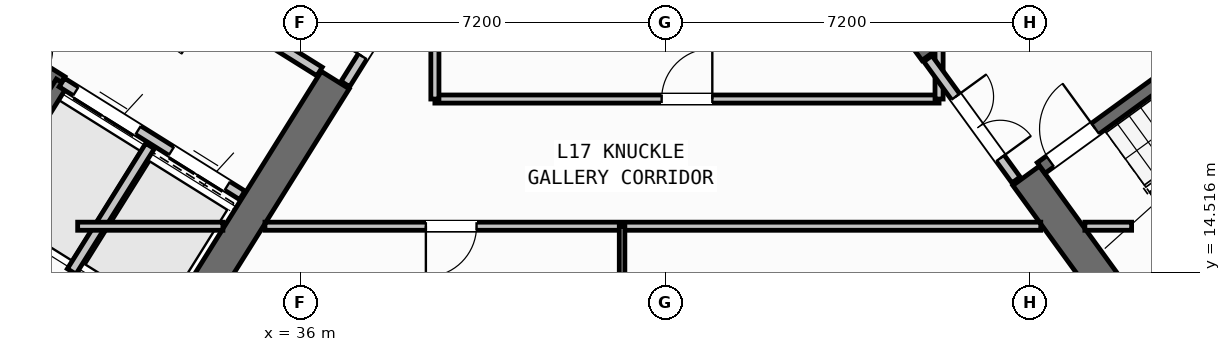
"""IFC4 building model, lengths in metres.
Left out: names, types, materials, properties, quantities, classifications, styles, units other than length and angle.
Written with IfcOpenShell. Run it as: python <this file> out.ifc"""

import sys

from ifc_helpers import new_model, si_unit, direction, frame, frame_2d, origin, place, context, subcontext, project, spatial, rectangle, extrude, source, transform, mapped, element, fill, save


model = new_model("IFC4")
c1 = context("Model", 3, precision=1e-05, world=origin(), true_north=direction((0.0, 1.0)))
c2 = subcontext(c1, "Body", "Model", "MODEL_VIEW")
j1 = project(units=[si_unit("LENGTHUNIT", "METRE"), si_unit("PLANEANGLEUNIT", "RADIAN")], contexts=[c1])
p1 = place(None, origin())
s1 = spatial("IfcSite", under=j1, at=p1, CompositionType="ELEMENT")
p2 = place(p1, origin())
s2 = spatial("IfcBuilding", under=s1, at=p2, CompositionType="ELEMENT")
p3 = place(p2, frame((0.0, 0.0, 67.2)))
s3 = spatial("IfcBuildingStorey", under=s2, at=p3, CompositionType="ELEMENT", Elevation=67.2)
p4 = place(p3, frame((33.409, 12.45, 0.0), z_axis=(0.0, 0.0, 1.0), x_axis=(-0.848051132073, 0.529914405721, 0.0)))
e1 = element("IfcWall", 1, at=p4, inside=s3, PredefinedType="SHEAR", context=c2, shape_type="SweptSolid", body=[
    extrude(rectangle(XDim=13.24, YDim=0.65, at=frame_2d((6.62, 0.0))), origin(), (0.0, 0.0, 1.0), 4.22),
])
p5 = place(p3, frame((36.683, 18.304, 0.0), z_axis=(0.0, 0.0, 1.0), x_axis=(-0.529899109053, -0.848060690178, 0.0)))
e2 = element("IfcWall", 2, at=p5, inside=s3, PredefinedType="SHEAR", context=c2, shape_type="SweptSolid", body=[
    extrude(rectangle(XDim=6.375, YDim=0.65, at=frame_2d((3.188, 0.0))), origin(), (0.0, 0.0, 1.0), 4.22),
])
p6 = place(p3, frame((52.318, 13.11, 0.0), z_axis=(0.0, 0.0, 1.0), x_axis=(0.809019445368, 0.587781878776, 0.0)))
e3 = element("IfcWall", 3, at=p6, inside=s3, PredefinedType="SHEAR", context=c2, shape_type="SweptSolid", body=[
    extrude(rectangle(XDim=12.44, YDim=0.65, at=frame_2d((6.22, 0.0))), origin(), (0.0, 0.0, 1.0), 4.22),
])
p7 = place(p3, frame((52.39, 13.564, 0.0), z_axis=(0.0, 0.0, 1.0), x_axis=(-0.58779688989, 0.809008539037, 0.0)))
e4 = element("IfcWall", 4, at=p7, inside=s3, PredefinedType="SHEAR", context=c2, shape_type="SweptSolid", body=[
    extrude(rectangle(XDim=3.525, YDim=0.65, at=frame_2d((1.763, 0.0))), origin(), (0.0, 0.0, 1.0), 4.22),
])
p8 = place(p3, frame((48.526, 18.884, 0.0), z_axis=(0.0, 0.0, 1.0), x_axis=(-0.58777996584, 0.809020835181, 0.0)))
e5 = element("IfcWall", 5, at=p8, inside=s3, PredefinedType="SHEAR", context=c2, shape_type="SweptSolid", body=[
    extrude(rectangle(XDim=6.375, YDim=0.65, at=frame_2d((3.188, 0.0))), origin(), (0.0, 0.0, 1.0), 4.22),
])
p9 = place(p3, frame((31.28, 18.261, 0.0), z_axis=(0.0, 0.0, 1.0), x_axis=(-0.848051618787, 0.529913626805, 0.0)))
e6 = element("IfcWall", 6, at=p9, inside=s3, PredefinedType="SHEAR", context=c2, shape_type="SweptSolid", body=[
    extrude(rectangle(XDim=7.46, YDim=0.26, at=frame_2d((3.73, 0.0))), origin(), (0.0, 0.0, 1.0), 4.22),
])
p10 = place(p9, frame((0.36, 0.0, 0.0)))
e7 = element("IfcOpeningElement", 7, at=p10, cuts=e6, PredefinedType="OPENING", context=c2, shape_type="SweptSolid", body=[
    extrude(rectangle(XDim=0.86, YDim=2.05, at=frame_2d((0.43, 1.025))), frame((0.0, 0.14, 0.0), z_axis=(0.0, -1.0, 0.0), x_axis=(1.0, 0.0, 0.0)), (0.0, 0.0, 1.0), 0.28),
])
p11 = place(p3, frame((31.288, 18.256, 0.0), z_axis=(0.0, 0.0, 1.0), x_axis=(-0.529943379326, -0.848033026897, 0.0)))
e8 = element("IfcWall", 8, at=p11, inside=s3, PredefinedType="SHEAR", context=c2, shape_type="SweptSolid", body=[
    extrude(rectangle(XDim=3.16, YDim=0.26, at=frame_2d((1.58, 0.0))), origin(), (0.0, 0.0, 1.0), 4.22),
])
p12 = place(p3, frame((34.848, 16.031, 0.0), z_axis=(0.0, 0.0, 1.0), x_axis=(-0.848044042236, 0.529925751807, 0.0)))
e9 = element("IfcWall", 9, at=p12, inside=s3, PredefinedType="STANDARD", context=c2, shape_type="SweptSolid", body=[
    extrude(rectangle(XDim=4.198, YDim=0.2, at=frame_2d((2.099, 0.0))), origin(), (0.0, 0.0, 1.0), 4.21),
])
p13 = place(p12, frame((0.348, 0.0, 0.0)))
e10 = element("IfcOpeningElement", 10, at=p13, cuts=e9, PredefinedType="OPENING", context=c2, shape_type="SweptSolid", body=[
    extrude(rectangle(XDim=1.3, YDim=2.2, at=frame_2d((0.65, 1.1))), frame((0.0, 0.11, 0.0), z_axis=(0.0, -1.0, 0.0), x_axis=(1.0, 0.0, 0.0)), (0.0, 0.0, 1.0), 0.22),
])
p14 = place(p12, frame((2.423, 0.0, 0.0)))
e11 = element("IfcOpeningElement", 11, at=p14, cuts=e9, PredefinedType="OPENING", context=c2, shape_type="SweptSolid", body=[
    extrude(rectangle(XDim=1.45, YDim=2.25, at=frame_2d((0.725, 1.125))), frame((0.0, 0.11, 0.0), z_axis=(0.0, -1.0, 0.0), x_axis=(1.0, 0.0, 0.0)), (0.0, 0.0, 1.0), 0.22),
])
p15 = place(p3, frame((36.374, 18.474, 0.0), z_axis=(0.0, 0.0, 1.0), x_axis=(-0.848051071577, 0.529914502535, 0.0)))
e12 = element("IfcWall", 12, at=p15, inside=s3, PredefinedType="STANDARD", context=c2, shape_type="SweptSolid", body=[
    extrude(rectangle(XDim=5.718, YDim=0.2, at=frame_2d((2.859, 0.0))), origin(), (0.0, 0.0, 1.0), 4.21),
])
p16 = place(p15, frame((2.498, 0.0, 0.0)))
e13 = element("IfcOpeningElement", 13, at=p16, cuts=e12, PredefinedType="OPENING", context=c2, shape_type="SweptSolid", body=[
    extrude(rectangle(XDim=1.15, YDim=2.1, at=frame_2d((0.575, 1.05))), frame((0.0, 0.11, 0.0), z_axis=(0.0, -1.0, 0.0), x_axis=(1.0, 0.0, 0.0)), (0.0, 0.0, 1.0), 0.22),
])
p17 = place(p3, frame((33.029, 17.003, 0.0), z_axis=(0.0, 0.0, 1.0), x_axis=(-0.529916267533, -0.848049968695, 0.0)))
e14 = element("IfcWall", 14, at=p17, inside=s3, PredefinedType="STANDARD", context=c2, shape_type="SweptSolid", body=[
    extrude(rectangle(XDim=2.92, YDim=0.2, at=frame_2d((1.46, 0.0))), origin(), (0.0, 0.0, 1.0), 4.21),
])
p18 = place(p3, frame((52.472, 14.013, 0.0), z_axis=(0.0, 0.0, 1.0), x_axis=(0.809028366311, 0.587769599847, 0.0)))
e15 = element("IfcWall", 15, at=p18, inside=s3, PredefinedType="SHEAR", context=c2, shape_type="SweptSolid", body=[
    extrude(rectangle(XDim=7.33, YDim=0.26, at=frame_2d((3.665, 0.0))), origin(), (0.0, 0.0, 1.0), 4.22),
])
p19 = place(p3, frame((50.615, 16.57, 0.0), z_axis=(0.0, 0.0, 1.0), x_axis=(0.809028366311, 0.587769599847, 0.0)))
e16 = element("IfcWall", 16, at=p19, inside=s3, PredefinedType="SHEAR", context=c2, shape_type="SweptSolid", body=[
    extrude(rectangle(XDim=7.33, YDim=0.26, at=frame_2d((3.665, 0.0))), origin(), (0.0, 0.0, 1.0), 4.22),
])
p20 = place(p19, frame((0.22, 0.0, 0.0)))
e17 = element("IfcOpeningElement", 17, at=p20, cuts=e16, PredefinedType="OPENING", context=c2, shape_type="SweptSolid", body=[
    extrude(rectangle(XDim=1.1, YDim=2.1, at=frame_2d((0.55, 1.05))), frame((0.0, 0.14, 0.0), z_axis=(0.0, -1.0, 0.0), x_axis=(1.0, 0.0, 0.0)), (0.0, 0.0, 1.0), 0.28),
])
p21 = place(p3, frame((32.164, 10.374, 0.0), z_axis=(0.0, 0.0, 1.0), x_axis=(-0.848044107957, 0.529925646633, 0.0)))
e18 = element("IfcWall", 18, at=p21, inside=s3, PredefinedType="PARTITIONING", context=c2, shape_type="SweptSolid", body=[
    extrude(rectangle(XDim=15.57, YDim=0.16, at=frame_2d((7.785, 0.0))), origin(), (0.0, 0.0, 1.0), 4.21),
])
p22 = place(p21, frame((10.83, 0.0, 0.0)))
e19 = element("IfcOpeningElement", 19, at=p22, cuts=e18, PredefinedType="OPENING", context=c2, shape_type="SweptSolid", body=[
    extrude(rectangle(XDim=1.0, YDim=2.1, at=frame_2d((0.5, 1.05))), frame((0.0, 0.09, 0.0), z_axis=(0.0, -1.0, 0.0), x_axis=(1.0, 0.0, 0.0)), (0.0, 0.0, 1.0), 0.18),
])
p23 = place(p3, frame((38.451, 20.737, 0.0), z_axis=(0.0, 0.0, 1.0), x_axis=(-0.529924799939, -0.848044637038, 0.0)))
e20 = element("IfcWall", 20, at=p23, inside=s3, PredefinedType="STANDARD", context=c2, shape_type="SweptSolid", body=[
    extrude(rectangle(XDim=2.96, YDim=0.2, at=frame_2d((1.48, 0.0))), origin(), (0.0, 0.0, 1.0), 2.395),
])
p24 = place(p23, frame((1.46, 0.0, 0.0)))
e21 = element("IfcOpeningElement", 21, at=p24, cuts=e20, PredefinedType="OPENING", context=c2, shape_type="SweptSolid", body=[
    extrude(rectangle(XDim=0.86, YDim=2.05, at=frame_2d((0.43, 1.025))), frame((0.0, 0.11, 0.0), z_axis=(0.0, -1.0, 0.0), x_axis=(1.0, 0.0, 0.0)), (0.0, 0.0, 1.0), 0.22),
])
p25 = place(p3, frame((31.6, 15.42, 0.0), z_axis=(0.0, 0.0, 1.0), x_axis=(1.0, 0.0, 0.0)))
e22 = element("IfcWall", 22, at=p25, inside=s3, PredefinedType="PARTITIONING", context=c2, shape_type="SweptSolid", body=[
    extrude(rectangle(XDim=2.866, YDim=0.16, at=frame_2d((1.433, 0.0))), origin(), (0.0, 0.0, 1.0), 4.21),
])
p26 = place(p3, frame((35.296, 15.42, 0.0), z_axis=(0.0, 0.0, 1.0), x_axis=(1.0, 0.0, 0.0)))
e23 = element("IfcWall", 23, at=p26, inside=s3, PredefinedType="PARTITIONING", context=c2, shape_type="SweptSolid", body=[
    extrude(rectangle(XDim=15.311, YDim=0.16, at=frame_2d((7.655, 0.0))), origin(), (0.0, 0.0, 1.0), 4.21),
])
p27 = place(p26, frame((3.176, 0.0, 0.0)))
e24 = element("IfcOpeningElement", 24, at=p27, cuts=e23, PredefinedType="OPENING", context=c2, shape_type="SweptSolid", body=[
    extrude(rectangle(XDim=1.0, YDim=2.1, at=frame_2d((0.5, 1.05))), frame((0.0, 0.09, 0.0), z_axis=(0.0, -1.0, 0.0), x_axis=(1.0, 0.0, 0.0)), (0.0, 0.0, 1.0), 0.18),
])
p28 = place(p3, frame((51.477, 15.42, 0.0), z_axis=(0.0, 0.0, 1.0), x_axis=(1.0, 0.0, 0.0)))
e25 = element("IfcWall", 25, at=p28, inside=s3, PredefinedType="PARTITIONING", context=c2, shape_type="SweptSolid", body=[
    extrude(rectangle(XDim=0.923, YDim=0.16, at=frame_2d((0.461, 0.0))), origin(), (0.0, 0.0, 1.0), 4.21),
])
p29 = place(p3, frame((38.65, 17.93, 0.0), z_axis=(0.0, 0.0, 1.0), x_axis=(1.0, 0.0, 0.0)))
e26 = element("IfcWall", 26, at=p29, inside=s3, PredefinedType="PARTITIONING", context=c2, shape_type="SweptSolid", body=[
    extrude(rectangle(XDim=9.95, YDim=0.16, at=frame_2d((4.975, 0.0))), origin(), (0.0, 0.0, 1.0), 4.21),
])
p30 = place(p29, frame((4.475, 0.0, 0.0)))
e27 = element("IfcOpeningElement", 27, at=p30, cuts=e26, PredefinedType="OPENING", context=c2, shape_type="SweptSolid", body=[
    extrude(rectangle(XDim=1.0, YDim=2.1, at=frame_2d((0.5, 1.05))), frame((0.0, 0.09, 0.0), z_axis=(0.0, -1.0, 0.0), x_axis=(1.0, 0.0, 0.0)), (0.0, 0.0, 1.0), 0.18),
])
p31 = place(p3, frame((38.65, 17.93, 0.0), z_axis=(0.0, 0.0, 1.0), x_axis=(0.0, 1.0, 0.0)))
e28 = element("IfcWall", 28, at=p31, inside=s3, PredefinedType="PARTITIONING", context=c2, shape_type="SweptSolid", body=[
    extrude(rectangle(XDim=2.857, YDim=0.16, at=frame_2d((1.428, 0.0))), origin(), (0.0, 0.0, 1.0), 4.21),
])
p32 = place(p3, frame((48.6, 17.93, 0.0), z_axis=(0.0, 0.0, 1.0), x_axis=(0.0, 1.0, 0.0)))
e29 = element("IfcWall", 29, at=p32, inside=s3, PredefinedType="PARTITIONING", context=c2, shape_type="SweptSolid", body=[
    extrude(rectangle(XDim=0.993, YDim=0.16, at=frame_2d((0.496, 0.0))), origin(), (0.0, 0.0, 1.0), 4.21),
])
p33 = place(p3, frame((50.119, 16.333, 0.0), z_axis=(0.0, 0.0, 1.0), x_axis=(-0.587749856981, 0.809042709391, 0.0)))
e30 = element("IfcWall", 30, at=p33, inside=s3, PredefinedType="STANDARD", context=c2, shape_type="SweptSolid", body=[
    extrude(rectangle(XDim=2.96, YDim=0.2, at=frame_2d((1.48, 0.0))), origin(), (0.0, 0.0, 1.0), 2.395),
])
p34 = place(p33, frame((0.53, 0.0, 0.0)))
e31 = element("IfcOpeningElement", 31, at=p34, cuts=e30, PredefinedType="OPENING", context=c2, shape_type="SweptSolid", body=[
    extrude(rectangle(XDim=1.5, YDim=2.15, at=frame_2d((0.75, 1.075))), frame((0.0, 0.11, 0.0), z_axis=(0.0, -1.0, 0.0), x_axis=(1.0, 0.0, 0.0)), (0.0, 0.0, 1.0), 0.22),
])
p35 = place(p3, frame((42.344, 1.96, 0.0), z_axis=(0.0, 0.0, 1.0), x_axis=(0.0, 1.0, 0.0)))
e32 = element("IfcWall", 32, at=p35, inside=s3, PredefinedType="PARTITIONING", context=c2, shape_type="SweptSolid", body=[
    extrude(rectangle(XDim=13.46, YDim=0.11, at=frame_2d((6.73, 0.0))), origin(), (0.0, 0.0, 1.0), 4.21),
])
p36 = place(p35, frame((5.44, 0.0, 0.0)))
e33 = element("IfcOpeningElement", 33, at=p36, cuts=e32, PredefinedType="OPENING", context=c2, shape_type="SweptSolid", body=[
    extrude(rectangle(XDim=0.92, YDim=2.08, at=frame_2d((0.46, 1.04))), frame((0.0, 0.065, 0.0), z_axis=(0.0, -1.0, 0.0), x_axis=(1.0, 0.0, 0.0)), (0.0, 0.0, 1.0), 0.13),
])
p37 = place(p35, frame((10.67, 0.0, 0.0)))
e34 = element("IfcOpeningElement", 34, at=p37, cuts=e32, PredefinedType="OPENING", context=c2, shape_type="SweptSolid", body=[
    extrude(rectangle(XDim=0.88, YDim=2.08, at=frame_2d((0.44, 1.04))), frame((0.0, 0.065, 0.0), z_axis=(0.0, -1.0, 0.0), x_axis=(1.0, 0.0, 0.0)), (0.0, 0.0, 1.0), 0.13),
])
m1 = source(origin(), c2, "Body", "SweptSolid", [
    extrude(rectangle(XDim=1.3, YDim=2.2, at=frame_2d((0.65, 1.1))), frame((0.0, 0.025, 0.0), z_axis=(0.0, -1.0, 0.0), x_axis=(1.0, 0.0, 0.0)), (0.0, 0.0, 1.0), 0.05),
])
p38 = place(p13, origin())
e35 = element("IfcDoor", 35, at=p38, inside=s3, OperationType="DOUBLE_DOOR_SLIDING", PredefinedType="DOOR", context=c2, shape_type="MappedRepresentation", body=[
    mapped(m1, transform((0.0, 0.0, 0.0), scale=1.0)),
])
fill(e10, e35)
m2 = source(origin(), c2, "Body", "SweptSolid", [
    extrude(rectangle(XDim=1.45, YDim=2.25, at=frame_2d((0.725, 1.125))), frame((0.0, 0.025, 0.0), z_axis=(0.0, -1.0, 0.0), x_axis=(1.0, 0.0, 0.0)), (0.0, 0.0, 1.0), 0.05),
])
p39 = place(p14, origin())
e36 = element("IfcDoor", 36, at=p39, inside=s3, OperationType="DOUBLE_DOOR_SLIDING", PredefinedType="DOOR", context=c2, shape_type="MappedRepresentation", body=[
    mapped(m2, transform((0.0, 0.0, 0.0), scale=1.0)),
])
fill(e11, e36)
m3 = source(origin(), c2, "Body", "SweptSolid", [
    extrude(rectangle(XDim=1.1, YDim=2.1, at=frame_2d((0.55, 1.05))), frame((0.0, 0.025, 0.0), z_axis=(0.0, -1.0, 0.0), x_axis=(1.0, 0.0, 0.0)), (0.0, 0.0, 1.0), 0.05),
])
p40 = place(p20, origin())
e37 = element("IfcDoor", 37, at=p40, inside=s3, OperationType="SINGLE_SWING_RIGHT", PredefinedType="DOOR", context=c2, shape_type="MappedRepresentation", body=[
    mapped(m3, transform((0.0, 0.0, 0.0), scale=1.0)),
])
fill(e17, e37)
m4 = source(origin(), c2, "Body", "SweptSolid", [
    extrude(rectangle(XDim=1.0, YDim=2.1, at=frame_2d((0.5, 1.05))), frame((0.0, 0.025, 0.0), z_axis=(0.0, -1.0, 0.0), x_axis=(1.0, 0.0, 0.0)), (0.0, 0.0, 1.0), 0.05),
])
p41 = place(p30, origin())
e38 = element("IfcDoor", 38, at=p41, inside=s3, OperationType="SINGLE_SWING_RIGHT", PredefinedType="DOOR", context=c2, shape_type="MappedRepresentation", body=[
    mapped(m4, transform((0.0, 0.0, 0.0), scale=1.0)),
])
fill(e27, e38)
m5 = source(origin(), c2, "Body", "SweptSolid", [
    extrude(rectangle(XDim=0.86, YDim=2.05, at=frame_2d((0.43, 1.025))), frame((0.0, 0.025, 0.0), z_axis=(0.0, -1.0, 0.0), x_axis=(1.0, 0.0, 0.0)), (0.0, 0.0, 1.0), 0.05),
])
p42 = place(p24, frame((0.86, 0.0, 0.0), z_axis=(0.0, 0.0, 1.0), x_axis=(-1.0, 0.0, 0.0)))
e39 = element("IfcDoor", 39, at=p42, inside=s3, OperationType="SINGLE_SWING_LEFT", PredefinedType="DOOR", context=c2, shape_type="MappedRepresentation", body=[
    mapped(m5, transform((0.0, 0.0, 0.0), scale=1.0)),
])
fill(e21, e39)
m6 = source(origin(), c2, "Body", "SweptSolid", [
    extrude(rectangle(XDim=1.5, YDim=2.15, at=frame_2d((0.75, 1.075))), frame((0.0, 0.025, 0.0), z_axis=(0.0, -1.0, 0.0), x_axis=(1.0, 0.0, 0.0)), (0.0, 0.0, 1.0), 0.05),
])
p43 = place(p34, frame((1.5, 0.0, 0.0), z_axis=(0.0, 0.0, 1.0), x_axis=(-1.0, 0.0, 0.0)))
e40 = element("IfcDoor", 40, at=p43, inside=s3, OperationType="DOUBLE_DOOR_SINGLE_SWING", PredefinedType="DOOR", context=c2, shape_type="MappedRepresentation", body=[
    mapped(m6, transform((0.0, 0.0, 0.0), scale=1.0)),
])
fill(e31, e40)
p44 = place(p27, frame((1.0, 0.0, 0.0), z_axis=(0.0, 0.0, 1.0), x_axis=(-1.0, 0.0, 0.0)))
e41 = element("IfcDoor", 41, at=p44, inside=s3, OperationType="SINGLE_SWING_RIGHT", PredefinedType="DOOR", context=c2, shape_type="MappedRepresentation", body=[
    mapped(m4, transform((0.0, 0.0, 0.0), scale=1.0)),
])
fill(e24, e41)
save(model, sys.argv[1])
